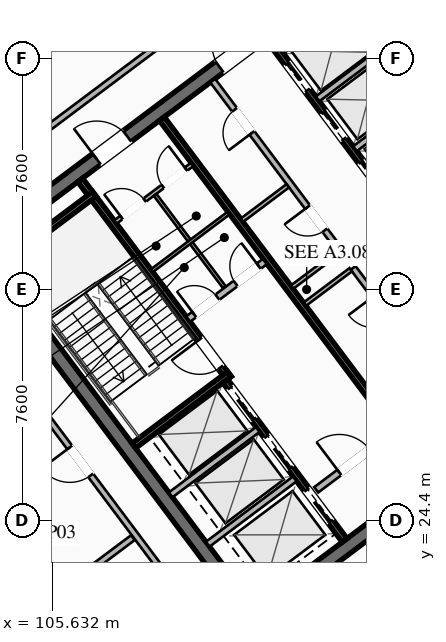
"""IFC4 building model, lengths in metres.
Left out: names, types, materials, properties, quantities, classifications, styles, units other than length and angle.
Written with IfcOpenShell. Run it as: python <this file> out.ifc"""

import sys

from ifc_helpers import new_model, si_unit, direction, frame, frame_2d, origin, place, context, subcontext, project, spatial, rectangle, extrude, element, fill, save


model = new_model("IFC4")
c1 = context("Model", 3, precision=1e-05, world=origin(), true_north=direction((0.0, 1.0)))
c2 = subcontext(c1, "Body", "Model", "MODEL_VIEW")
j1 = project(units=[si_unit("LENGTHUNIT", "METRE"), si_unit("PLANEANGLEUNIT", "RADIAN")], contexts=[c1])
p1 = place(None, origin())
s1 = spatial("IfcSite", under=j1, at=p1, CompositionType="ELEMENT")
p2 = place(p1, origin())
s2 = spatial("IfcBuilding", under=s1, at=p2, CompositionType="ELEMENT")
p3 = place(p2, frame((0.0, 0.0, 246.8)))
s3 = spatial("IfcBuildingStorey", under=s2, at=p3, CompositionType="ELEMENT", Elevation=246.8)
for number, where, z_axis, x_axis in (
    (1, (112.396, 21.047, 0.0), (0.0, 0.0, 1.0), (-0.6, 0.8, 0.0)),
    (2, (115.604, 42.953, 0.0), (0.0, 0.0, 1.0), (0.6, -0.8, 0.0)),
):
    element("IfcWall", number, at=place(p3, frame(where, z_axis=z_axis, x_axis=x_axis)), inside=s3, PredefinedType="SHEAR", context=c2, shape_type="SweptSolid", body=[
        extrude(rectangle(XDim=15.6, YDim=0.45, at=frame_2d((7.8, 0.0))), origin(), (0.0, 0.0, 1.0), 4.6),
    ])
p4 = place(p3, frame((124.649, 30.518, 0.0), z_axis=(0.0, 0.0, 1.0), x_axis=(-0.8, -0.6, 0.0)))
e3 = element("IfcWall", 3, at=p4, inside=s3, PredefinedType="SHEAR", context=c2, shape_type="SweptSolid", body=[
    extrude(rectangle(XDim=15.26, YDim=0.45, at=frame_2d((7.63, 0.0))), origin(), (0.0, 0.0, 1.0), 4.6),
])
p5 = place(p4, frame((9.33, 0.0, 0.0)))
e4 = element("IfcOpeningElement", 4, at=p5, cuts=e3, PredefinedType="OPENING", context=c2, shape_type="SweptSolid", body=[
    extrude(rectangle(XDim=1.25, YDim=2.25, at=frame_2d((0.625, 1.125))), frame((0.0, 0.235, 0.0), z_axis=(0.0, -1.0, 0.0), x_axis=(1.0, 0.0, 0.0)), (0.0, 0.0, 1.0), 0.47),
])
p6 = place(p4, frame((4.28, 0.0, 0.0)))
e5 = element("IfcOpeningElement", 5, at=p6, cuts=e3, PredefinedType="OPENING", context=c2, shape_type="SweptSolid", body=[
    extrude(rectangle(XDim=1.25, YDim=2.25, at=frame_2d((0.625, 1.125))), frame((0.0, 0.235, 0.0), z_axis=(0.0, -1.0, 0.0), x_axis=(1.0, 0.0, 0.0)), (0.0, 0.0, 1.0), 0.47),
])
p7 = place(p3, frame((103.351, 33.482, 0.0), z_axis=(0.0, 0.0, 1.0), x_axis=(0.8, 0.6, 0.0)))
e6 = element("IfcWall", 6, at=p7, inside=s3, PredefinedType="SHEAR", context=c2, shape_type="SweptSolid", body=[
    extrude(rectangle(XDim=15.26, YDim=0.45, at=frame_2d((7.63, 0.0))), origin(), (0.0, 0.0, 1.0), 4.6),
])
p8 = place(p7, frame((4.68, 0.0, 0.0)))
e7 = element("IfcOpeningElement", 7, at=p8, cuts=e6, PredefinedType="OPENING", context=c2, shape_type="SweptSolid", body=[
    extrude(rectangle(XDim=1.25, YDim=2.25, at=frame_2d((0.625, 1.125))), frame((0.0, 0.235, 0.0), z_axis=(0.0, -1.0, 0.0), x_axis=(1.0, 0.0, 0.0)), (0.0, 0.0, 1.0), 0.47),
])
p9 = place(p7, frame((9.73, 0.0, 0.0)))
e8 = element("IfcOpeningElement", 8, at=p9, cuts=e6, PredefinedType="OPENING", context=c2, shape_type="SweptSolid", body=[
    extrude(rectangle(XDim=1.25, YDim=2.25, at=frame_2d((0.625, 1.125))), frame((0.0, 0.235, 0.0), z_axis=(0.0, -1.0, 0.0), x_axis=(1.0, 0.0, 0.0)), (0.0, 0.0, 1.0), 0.47),
])
p10 = place(p3, frame((107.766, 15.512, 0.0), z_axis=(0.0, 0.0, 1.0), x_axis=(-0.6, 0.8, 0.0)))
e9 = element("IfcWall", 9, at=p10, inside=s3, PredefinedType="SOLIDWALL", context=c2, shape_type="SweptSolid", body=[
    extrude(rectangle(XDim=18.9, YDim=0.28, at=frame_2d((9.45, 0.0))), origin(), (0.0, 0.0, 1.0), 4.38),
])
p11 = place(p3, frame((111.44, 29.08, 0.0), z_axis=(0.0, 0.0, 1.0), x_axis=(-0.59999041401, 0.800007189403, 0.0)))
e10 = element("IfcWall", 10, at=p11, inside=s3, PredefinedType="SHEAR", context=c2, shape_type="SweptSolid", body=[
    extrude(rectangle(XDim=8.15, YDim=0.2, at=frame_2d((4.075, 0.0))), origin(), (0.0, 0.0, 1.0), 4.38),
])
p12 = place(p11, frame((0.45, 0.0, 0.0)))
e11 = element("IfcOpeningElement", 11, at=p12, cuts=e10, PredefinedType="OPENING", context=c2, shape_type="SweptSolid", body=[
    extrude(rectangle(XDim=1.15, YDim=2.2, at=frame_2d((0.575, 1.1))), frame((0.0, 0.11, 0.0), z_axis=(0.0, -1.0, 0.0), x_axis=(1.0, 0.0, 0.0)), (0.0, 0.0, 1.0), 0.22),
])
for number, where, z_axis, x_axis in (
    (12, (108.316, 26.862, 0.0), (0.0, 0.0, 1.0), (0.8, 0.6, 0.0)),
    (13, (103.876, 32.782, 0.0), (0.0, 0.0, 1.0), (0.8, 0.6, 0.0)),
):
    element("IfcWall", number, at=place(p3, frame(where, z_axis=z_axis, x_axis=x_axis)), inside=s3, PredefinedType="SHEAR", context=c2, shape_type="SweptSolid", body=[
        extrude(rectangle(XDim=3.93, YDim=0.2, at=frame_2d((1.965, 0.0))), origin(), (0.0, 0.0, 1.0), 4.38),
    ])
p13 = place(p3, frame((118.058, 25.856, 0.0), z_axis=(0.0, 0.0, 1.0), x_axis=(-0.600002657301, 0.799998007018, 0.0)))
e14 = element("IfcWall", 14, at=p13, inside=s3, PredefinedType="SHEAR", context=c2, shape_type="SweptSolid", body=[
    extrude(rectangle(XDim=14.7, YDim=0.2, at=frame_2d((7.35, 0.0))), origin(), (0.0, 0.0, 1.0), 4.38),
])
p14 = place(p3, frame((110.104, 31.028, 0.0), z_axis=(0.0, 0.0, 1.0), x_axis=(0.800018601094, 0.59997519774, 0.0)))
e15 = element("IfcWall", 15, at=p14, inside=s3, PredefinedType="SOLIDWALL", context=c2, shape_type="SweptSolid", body=[
    extrude(rectangle(XDim=3.15, YDim=0.22, at=frame_2d((1.575, 0.0))), origin(), (0.0, 0.0, 1.0), 3.491),
])
p15 = place(p14, frame((0.25, 0.0, 0.0)))
e16 = element("IfcOpeningElement", 16, at=p15, cuts=e15, PredefinedType="OPENING", context=c2, shape_type="SweptSolid", body=[
    extrude(rectangle(XDim=0.95, YDim=2.05, at=frame_2d((0.475, 1.025))), frame((0.0, 0.12, 0.0), z_axis=(0.0, -1.0, 0.0), x_axis=(1.0, 0.0, 0.0)), (0.0, 0.0, 1.0), 0.24),
])
p16 = place(p14, frame((1.95, 0.0, 0.0)))
e17 = element("IfcOpeningElement", 17, at=p16, cuts=e15, PredefinedType="OPENING", context=c2, shape_type="SweptSolid", body=[
    extrude(rectangle(XDim=0.95, YDim=2.05, at=frame_2d((0.475, 1.025))), frame((0.0, 0.12, 0.0), z_axis=(0.0, -1.0, 0.0), x_axis=(1.0, 0.0, 0.0)), (0.0, 0.0, 1.0), 0.24),
])
p17 = place(p3, frame((114.316, 25.412, 0.0), z_axis=(0.0, 0.0, 1.0), x_axis=(0.800018601094, 0.59997519774, 0.0)))
e18 = element("IfcWall", 18, at=p17, inside=s3, PredefinedType="SOLIDWALL", context=c2, shape_type="SweptSolid", body=[
    extrude(rectangle(XDim=3.15, YDim=0.22, at=frame_2d((1.575, 0.0))), origin(), (0.0, 0.0, 1.0), 3.491),
])
p18 = place(p17, frame((0.95, 0.0, 0.0)))
e19 = element("IfcOpeningElement", 19, at=p18, cuts=e18, PredefinedType="OPENING", context=c2, shape_type="SweptSolid", body=[
    extrude(rectangle(XDim=1.25, YDim=2.25, at=frame_2d((0.625, 1.125))), frame((0.0, 0.12, 0.0), z_axis=(0.0, -1.0, 0.0), x_axis=(1.0, 0.0, 0.0)), (0.0, 0.0, 1.0), 0.24),
])
p19 = place(p3, frame((115.25, 23.75, 0.0), z_axis=(0.0, 0.0, 1.0), x_axis=(-0.599994036198, 0.800004472816, 0.0)))
e20 = element("IfcWall", 20, at=p19, inside=s3, PredefinedType="SHEAR", context=c2, shape_type="SweptSolid", body=[
    extrude(rectangle(XDim=6.55, YDim=0.2, at=frame_2d((3.275, 0.0))), origin(), (0.0, 0.0, 1.0), 4.38),
])
p20 = place(p19, frame((4.975, 0.0, 0.0)))
e21 = element("IfcOpeningElement", 21, at=p20, cuts=e20, PredefinedType="OPENING", context=c2, shape_type="SweptSolid", body=[
    extrude(rectangle(XDim=1.3, YDim=2.25, at=frame_2d((0.65, 1.125))), frame((0.0, 0.11, 0.0), z_axis=(0.0, -1.0, 0.0), x_axis=(1.0, 0.0, 0.0)), (0.0, 0.0, 1.0), 0.22),
])
p21 = place(p19, frame((2.975, 0.0, 0.0)))
e22 = element("IfcOpeningElement", 22, at=p21, cuts=e20, PredefinedType="OPENING", context=c2, shape_type="SweptSolid", body=[
    extrude(rectangle(XDim=1.3, YDim=2.25, at=frame_2d((0.65, 1.125))), frame((0.0, 0.11, 0.0), z_axis=(0.0, -1.0, 0.0), x_axis=(1.0, 0.0, 0.0)), (0.0, 0.0, 1.0), 0.22),
])
p22 = place(p19, frame((0.775, 0.0, 0.0)))
e23 = element("IfcOpeningElement", 23, at=p22, cuts=e20, PredefinedType="OPENING", context=c2, shape_type="SweptSolid", body=[
    extrude(rectangle(XDim=1.3, YDim=2.25, at=frame_2d((0.65, 1.125))), frame((0.0, 0.11, 0.0), z_axis=(0.0, -1.0, 0.0), x_axis=(1.0, 0.0, 0.0)), (0.0, 0.0, 1.0), 0.22),
])
for number, where, z_axis, x_axis in (
    (24, (110.746, 23.622, 0.0), (0.0, 0.0, 1.0), (0.8, 0.6, 0.0)),
    (25, (109.528, 25.246, 0.0), (0.0, 0.0, 1.0), (0.8, 0.6, 0.0)),
):
    element("IfcWall", number, at=place(p3, frame(where, z_axis=z_axis, x_axis=x_axis)), inside=s3, PredefinedType="SOLIDWALL", context=c2, shape_type="SweptSolid", body=[
        extrude(rectangle(XDim=3.58, YDim=0.2, at=frame_2d((1.79, 0.0))), origin(), (0.0, 0.0, 1.0), 4.38),
    ])
p23 = place(p3, frame((112.75, 40.25, 0.0), z_axis=(0.0, 0.0, 1.0), x_axis=(0.599994036198, -0.800004472816, 0.0)))
e26 = element("IfcWall", 26, at=p23, inside=s3, PredefinedType="SHEAR", context=c2, shape_type="SweptSolid", body=[
    extrude(rectangle(XDim=6.55, YDim=0.2, at=frame_2d((3.275, 0.0))), origin(), (0.0, 0.0, 1.0), 4.38),
])
p24 = place(p23, frame((5.075, 0.0, 0.0)))
e27 = element("IfcOpeningElement", 27, at=p24, cuts=e26, PredefinedType="OPENING", context=c2, shape_type="SweptSolid", body=[
    extrude(rectangle(XDim=1.1, YDim=2.2, at=frame_2d((0.55, 1.1))), frame((0.0, 0.11, 0.0), z_axis=(0.0, -1.0, 0.0), x_axis=(1.0, 0.0, 0.0)), (0.0, 0.0, 1.0), 0.22),
])
p25 = place(p23, frame((3.025, 0.0, 0.0)))
e28 = element("IfcOpeningElement", 28, at=p25, cuts=e26, PredefinedType="OPENING", context=c2, shape_type="SweptSolid", body=[
    extrude(rectangle(XDim=1.1, YDim=2.2, at=frame_2d((0.55, 1.1))), frame((0.0, 0.11, 0.0), z_axis=(0.0, -1.0, 0.0), x_axis=(1.0, 0.0, 0.0)), (0.0, 0.0, 1.0), 0.22),
])
p26 = place(p23, frame((1.025, 0.0, 0.0)))
e29 = element("IfcOpeningElement", 29, at=p26, cuts=e26, PredefinedType="OPENING", context=c2, shape_type="SweptSolid", body=[
    extrude(rectangle(XDim=1.1, YDim=2.2, at=frame_2d((0.55, 1.1))), frame((0.0, 0.11, 0.0), z_axis=(0.0, -1.0, 0.0), x_axis=(1.0, 0.0, 0.0)), (0.0, 0.0, 1.0), 0.22),
])
for number, where, z_axis, x_axis in (
    (30, (115.59, 36.63, 0.0), (0.0, 0.0, 1.0), (0.8, 0.6, 0.0)),
    (31, (114.36, 38.27, 0.0), (0.0, 0.0, 1.0), (0.8, 0.6, 0.0)),
):
    element("IfcWall", number, at=place(p3, frame(where, z_axis=z_axis, x_axis=x_axis)), inside=s3, PredefinedType="SOLIDWALL", context=c2, shape_type="SweptSolid", body=[
        extrude(rectangle(XDim=3.58, YDim=0.2, at=frame_2d((1.79, 0.0))), origin(), (0.0, 0.0, 1.0), 4.38),
    ])
p27 = place(p3, frame((107.71, 34.22, 0.0), z_axis=(0.0, 0.0, 1.0), x_axis=(0.799981399002, 0.60002480053, 0.0)))
e32 = element("IfcWall", 32, at=p27, inside=s3, PredefinedType="PARTITIONING", context=c2, shape_type="SweptSolid", body=[
    extrude(rectangle(XDim=3.15, YDim=0.135, at=frame_2d((1.575, 0.0))), origin(), (0.0, 0.0, 1.0), 3.491),
])
p28 = place(p27, frame((0.25, 0.0, 0.0)))
e33 = element("IfcOpeningElement", 33, at=p28, cuts=e32, PredefinedType="OPENING", context=c2, shape_type="SweptSolid", body=[
    extrude(rectangle(XDim=0.95, YDim=2.05, at=frame_2d((0.475, 1.025))), frame((0.0, 0.077, 0.0), z_axis=(0.0, -1.0, 0.0), x_axis=(1.0, 0.0, 0.0)), (0.0, 0.0, 1.0), 0.155),
])
p29 = place(p27, frame((1.95, 0.0, 0.0)))
e34 = element("IfcOpeningElement", 34, at=p29, cuts=e32, PredefinedType="OPENING", context=c2, shape_type="SweptSolid", body=[
    extrude(rectangle(XDim=0.95, YDim=2.05, at=frame_2d((0.475, 1.025))), frame((0.0, 0.077, 0.0), z_axis=(0.0, -1.0, 0.0), x_axis=(1.0, 0.0, 0.0)), (0.0, 0.0, 1.0), 0.155),
])
p30 = place(p3, frame((111.296, 32.072, 0.0), z_axis=(0.0, 0.0, 1.0), x_axis=(-0.59995887973, 0.800030838552, 0.0)))
e35 = element("IfcWall", 35, at=p30, inside=s3, PredefinedType="PARTITIONING", context=c2, shape_type="SweptSolid", body=[
    extrude(rectangle(XDim=3.8, YDim=0.11, at=frame_2d((1.9, 0.0))), origin(), (0.0, 0.0, 1.0), 3.491),
])
p31 = place(p3, frame((108.91, 32.62, 0.0), z_axis=(0.0, 0.0, 1.0), x_axis=(0.800018601094, 0.59997519774, 0.0)))
e36 = element("IfcWall", 36, at=p31, inside=s3, PredefinedType="PARTITIONING", context=c2, shape_type="SweptSolid", body=[
    extrude(rectangle(XDim=3.15, YDim=0.11, at=frame_2d((1.575, 0.0))), origin(), (0.0, 0.0, 1.0), 3.491),
])
p32 = place(p3, frame((119.73, 27.11, 0.0), z_axis=(0.0, 0.0, 1.0), x_axis=(-0.600005580459, 0.799995814625, 0.0)))
e37 = element("IfcWall", 37, at=p32, inside=s3, PredefinedType="SOLIDWALL", context=c2, shape_type="SweptSolid", body=[
    extrude(rectangle(XDim=7.0, YDim=0.2, at=frame_2d((3.5, 0.0))), origin(), (0.0, 0.0, 1.0), 3.491),
])
p33 = place(p32, frame((0.85, 0.0, 0.0)))
e38 = element("IfcOpeningElement", 38, at=p33, cuts=e37, PredefinedType="OPENING", context=c2, shape_type="SweptSolid", body=[
    extrude(rectangle(XDim=0.95, YDim=2.05, at=frame_2d((0.475, 1.025))), frame((0.0, 0.11, 0.0), z_axis=(0.0, -1.0, 0.0), x_axis=(1.0, 0.0, 0.0)), (0.0, 0.0, 1.0), 0.22),
])
p34 = place(p32, frame((4.8, 0.0, 0.0)))
e39 = element("IfcOpeningElement", 39, at=p34, cuts=e37, PredefinedType="OPENING", context=c2, shape_type="SweptSolid", body=[
    extrude(rectangle(XDim=1.05, YDim=2.2, at=frame_2d((0.525, 1.1))), frame((0.0, 0.11, 0.0), z_axis=(0.0, -1.0, 0.0), x_axis=(1.0, 0.0, 0.0)), (0.0, 0.0, 1.0), 0.22),
])
p35 = place(p3, frame((113.946, 31.522, 0.0), z_axis=(0.0, 0.0, 1.0), x_axis=(0.8, 0.6, 0.0)))
e40 = element("IfcWall", 40, at=p35, inside=s3, PredefinedType="PARTITIONING", context=c2, shape_type="SweptSolid", body=[
    extrude(rectangle(XDim=1.88, YDim=0.135, at=frame_2d((0.94, 0.0))), origin(), (0.0, 0.0, 1.0), 3.491),
])
p36 = place(p3, frame((115.11, 33.27, 0.0), z_axis=(0.0, 0.0, 1.0), x_axis=(-0.600011160345, 0.79999162962, 0.0)))
e41 = element("IfcWall", 41, at=p36, inside=s3, PredefinedType="SOLIDWALL", context=c2, shape_type="SweptSolid", body=[
    extrude(rectangle(XDim=7.0, YDim=0.2, at=frame_2d((3.5, 0.0))), origin(), (0.0, 0.0, 1.0), 3.491),
])
p37 = place(p36, frame((0.85, 0.0, 0.0)))
e42 = element("IfcOpeningElement", 42, at=p37, cuts=e41, PredefinedType="OPENING", context=c2, shape_type="SweptSolid", body=[
    extrude(rectangle(XDim=0.95, YDim=2.05, at=frame_2d((0.475, 1.025))), frame((0.0, 0.11, 0.0), z_axis=(0.0, -1.0, 0.0), x_axis=(1.0, 0.0, 0.0)), (0.0, 0.0, 1.0), 0.22),
])
p38 = place(p36, frame((4.85, 0.0, 0.0)))
e43 = element("IfcOpeningElement", 43, at=p38, cuts=e41, PredefinedType="OPENING", context=c2, shape_type="SweptSolid", body=[
    extrude(rectangle(XDim=0.95, YDim=2.05, at=frame_2d((0.475, 1.025))), frame((0.0, 0.11, 0.0), z_axis=(0.0, -1.0, 0.0), x_axis=(1.0, 0.0, 0.0)), (0.0, 0.0, 1.0), 0.22),
])
p39 = place(p3, frame((113.526, 32.082, 0.0), z_axis=(0.0, 0.0, 1.0), x_axis=(0.800046745961, 0.599937666993, 0.0)))
e44 = element("IfcWall", 44, at=p39, inside=s3, PredefinedType="PARTITIONING", context=c2, shape_type="SweptSolid", body=[
    extrude(rectangle(XDim=1.88, YDim=0.135, at=frame_2d((0.94, 0.0))), origin(), (0.0, 0.0, 1.0), 3.491),
])
p40 = place(p3, frame((111.876, 34.282, 0.0), z_axis=(0.0, 0.0, 1.0), x_axis=(0.8, 0.6, 0.0)))
e45 = element("IfcWall", 45, at=p40, inside=s3, PredefinedType="PARTITIONING", context=c2, shape_type="SweptSolid", body=[
    extrude(rectangle(XDim=1.88, YDim=0.135, at=frame_2d((0.94, 0.0))), origin(), (0.0, 0.0, 1.0), 3.491),
])
for number, where, z_axis, x_axis in (
    (46, (100.91, 33.87, 0.0), (0.0, 0.0, 1.0), (0.8, 0.6, 0.0)),
    (47, (127.09, 30.13, 0.0), (0.0, 0.0, 1.0), (-0.8, -0.6, 0.0)),
):
    element("IfcWall", number, at=place(p3, frame(where, z_axis=z_axis, x_axis=x_axis)), inside=s3, PredefinedType="SOLIDWALL", context=c2, shape_type="SweptSolid", body=[
        extrude(rectangle(XDim=18.7, YDim=0.2, at=frame_2d((9.35, 0.0))), origin(), (0.0, 0.0, 1.0), 3.491),
    ])
p41 = place(p3, frame((112.058, 19.006, 0.0), z_axis=(0.0, 0.0, 1.0), x_axis=(-0.600010580279, 0.799992064682, 0.0)))
e48 = element("IfcWall", 48, at=p41, inside=s3, PredefinedType="SOLIDWALL", context=c2, shape_type="SweptSolid", body=[
    extrude(rectangle(XDim=18.46, YDim=0.2, at=frame_2d((9.23, 0.0))), origin(), (0.0, 0.0, 1.0), 3.491),
])
p42 = place(p41, frame((2.2, 0.0, 0.0)))
e49 = element("IfcOpeningElement", 49, at=p42, cuts=e48, PredefinedType="OPENING", context=c2, shape_type="SweptSolid", body=[
    extrude(rectangle(XDim=1.25, YDim=2.25, at=frame_2d((0.625, 1.125))), frame((0.0, 0.11, 0.0), z_axis=(0.0, -1.0, 0.0), x_axis=(1.0, 0.0, 0.0)), (0.0, 0.0, 1.0), 0.22),
])
p43 = place(p41, frame((8.6, 0.0, 0.0)))
e50 = element("IfcOpeningElement", 50, at=p43, cuts=e48, PredefinedType="OPENING", context=c2, shape_type="SweptSolid", body=[
    extrude(rectangle(XDim=1.15, YDim=2.2, at=frame_2d((0.575, 1.1))), frame((0.0, 0.11, 0.0), z_axis=(0.0, -1.0, 0.0), x_axis=(1.0, 0.0, 0.0)), (0.0, 0.0, 1.0), 0.22),
])
p44 = place(p41, frame((16.0, 0.0, 0.0)))
e51 = element("IfcOpeningElement", 51, at=p44, cuts=e48, PredefinedType="OPENING", context=c2, shape_type="SweptSolid", body=[
    extrude(rectangle(XDim=1.15, YDim=2.2, at=frame_2d((0.575, 1.1))), frame((0.0, 0.11, 0.0), z_axis=(0.0, -1.0, 0.0), x_axis=(1.0, 0.0, 0.0)), (0.0, 0.0, 1.0), 0.22),
])
p45 = place(p3, frame((103.956, 20.592, 0.0), z_axis=(0.0, 0.0, 1.0), x_axis=(0.800005415472, 0.599992779303, 0.0)))
e52 = element("IfcWall", 52, at=p45, inside=s3, PredefinedType="SOLIDWALL", context=c2, shape_type="SweptSolid", body=[
    extrude(rectangle(XDim=5.41, YDim=0.2, at=frame_2d((2.705, 0.0))), origin(), (0.0, 0.0, 1.0), 3.491),
])
p46 = place(p8, origin())
e53 = element("IfcDoor", 53, at=p46, inside=s3, OperationType="SINGLE_SWING_LEFT", PredefinedType="DOOR", context=c2, shape_type="SweptSolid", body=[
    extrude(rectangle(XDim=1.25, YDim=2.25, at=frame_2d((0.625, 1.125))), frame((0.0, 0.025, 0.0), z_axis=(0.0, -1.0, 0.0), x_axis=(1.0, 0.0, 0.0)), (0.0, 0.0, 1.0), 0.05),
])
fill(e7, e53)
p47 = place(p9, origin())
e54 = element("IfcDoor", 54, at=p47, inside=s3, OperationType="SINGLE_SWING_RIGHT", PredefinedType="DOOR", context=c2, shape_type="SweptSolid", body=[
    extrude(rectangle(XDim=1.25, YDim=2.25, at=frame_2d((0.625, 1.125))), frame((0.0, 0.025, 0.0), z_axis=(0.0, -1.0, 0.0), x_axis=(1.0, 0.0, 0.0)), (0.0, 0.0, 1.0), 0.05),
])
fill(e8, e54)
p48 = place(p12, origin())
e55 = element("IfcDoor", 55, at=p48, inside=s3, OperationType="SINGLE_SWING_RIGHT", PredefinedType="DOOR", context=c2, shape_type="SweptSolid", body=[
    extrude(rectangle(XDim=1.15, YDim=2.2, at=frame_2d((0.575, 1.1))), frame((0.0, 0.025, 0.0), z_axis=(0.0, -1.0, 0.0), x_axis=(1.0, 0.0, 0.0)), (0.0, 0.0, 1.0), 0.05),
])
fill(e11, e55)
p49 = place(p18, origin())
e56 = element("IfcDoor", 56, at=p49, inside=s3, OperationType="SINGLE_SWING_LEFT", PredefinedType="DOOR", context=c2, shape_type="SweptSolid", body=[
    extrude(rectangle(XDim=1.25, YDim=2.25, at=frame_2d((0.625, 1.125))), frame((0.0, 0.025, 0.0), z_axis=(0.0, -1.0, 0.0), x_axis=(1.0, 0.0, 0.0)), (0.0, 0.0, 1.0), 0.05),
])
fill(e19, e56)
p50 = place(p28, origin())
e57 = element("IfcDoor", 57, at=p50, inside=s3, OperationType="SINGLE_SWING_LEFT", PredefinedType="DOOR", context=c2, shape_type="SweptSolid", body=[
    extrude(rectangle(XDim=0.95, YDim=2.05, at=frame_2d((0.475, 1.025))), frame((0.0, 0.025, 0.0), z_axis=(0.0, -1.0, 0.0), x_axis=(1.0, 0.0, 0.0)), (0.0, 0.0, 1.0), 0.05),
])
fill(e33, e57)
p51 = place(p29, origin())
e58 = element("IfcDoor", 58, at=p51, inside=s3, OperationType="SINGLE_SWING_RIGHT", PredefinedType="DOOR", context=c2, shape_type="SweptSolid", body=[
    extrude(rectangle(XDim=0.95, YDim=2.05, at=frame_2d((0.475, 1.025))), frame((0.0, 0.025, 0.0), z_axis=(0.0, -1.0, 0.0), x_axis=(1.0, 0.0, 0.0)), (0.0, 0.0, 1.0), 0.05),
])
fill(e34, e58)
p52 = place(p15, origin())
e59 = element("IfcDoor", 59, at=p52, inside=s3, OperationType="SINGLE_SWING_LEFT", PredefinedType="DOOR", context=c2, shape_type="SweptSolid", body=[
    extrude(rectangle(XDim=0.95, YDim=2.05, at=frame_2d((0.475, 1.025))), frame((0.0, 0.025, 0.0), z_axis=(0.0, -1.0, 0.0), x_axis=(1.0, 0.0, 0.0)), (0.0, 0.0, 1.0), 0.05),
])
fill(e16, e59)
p53 = place(p16, origin())
e60 = element("IfcDoor", 60, at=p53, inside=s3, OperationType="SINGLE_SWING_RIGHT", PredefinedType="DOOR", context=c2, shape_type="SweptSolid", body=[
    extrude(rectangle(XDim=0.95, YDim=2.05, at=frame_2d((0.475, 1.025))), frame((0.0, 0.025, 0.0), z_axis=(0.0, -1.0, 0.0), x_axis=(1.0, 0.0, 0.0)), (0.0, 0.0, 1.0), 0.05),
])
fill(e17, e60)
p54 = place(p37, origin())
e61 = element("IfcDoor", 61, at=p54, inside=s3, OperationType="SINGLE_SWING_RIGHT", PredefinedType="DOOR", context=c2, shape_type="SweptSolid", body=[
    extrude(rectangle(XDim=0.95, YDim=2.05, at=frame_2d((0.475, 1.025))), frame((0.0, 0.025, 0.0), z_axis=(0.0, -1.0, 0.0), x_axis=(1.0, 0.0, 0.0)), (0.0, 0.0, 1.0), 0.05),
])
fill(e42, e61)
p55 = place(p38, origin())
e62 = element("IfcDoor", 62, at=p55, inside=s3, OperationType="SINGLE_SWING_LEFT", PredefinedType="DOOR", context=c2, shape_type="SweptSolid", body=[
    extrude(rectangle(XDim=0.95, YDim=2.05, at=frame_2d((0.475, 1.025))), frame((0.0, 0.025, 0.0), z_axis=(0.0, -1.0, 0.0), x_axis=(1.0, 0.0, 0.0)), (0.0, 0.0, 1.0), 0.05),
])
fill(e43, e62)
p56 = place(p43, origin())
e63 = element("IfcDoor", 63, at=p56, inside=s3, OperationType="SINGLE_SWING_RIGHT", PredefinedType="DOOR", context=c2, shape_type="SweptSolid", body=[
    extrude(rectangle(XDim=1.15, YDim=2.2, at=frame_2d((0.575, 1.1))), frame((0.0, 0.025, 0.0), z_axis=(0.0, -1.0, 0.0), x_axis=(1.0, 0.0, 0.0)), (0.0, 0.0, 1.0), 0.05),
])
fill(e50, e63)
p57 = place(p20, origin())
e64 = element("IfcDoor", 64, at=p57, inside=s3, OperationType="SLIDING_TO_LEFT", PredefinedType="DOOR", context=c2, shape_type="SweptSolid", body=[
    extrude(rectangle(XDim=1.3, YDim=2.25, at=frame_2d((0.65, 1.125))), frame((0.0, 0.025, 0.0), z_axis=(0.0, -1.0, 0.0), x_axis=(1.0, 0.0, 0.0)), (0.0, 0.0, 1.0), 0.05),
])
fill(e21, e64)
p58 = place(p21, origin())
e65 = element("IfcDoor", 65, at=p58, inside=s3, OperationType="SLIDING_TO_LEFT", PredefinedType="DOOR", context=c2, shape_type="SweptSolid", body=[
    extrude(rectangle(XDim=1.3, YDim=2.25, at=frame_2d((0.65, 1.125))), frame((0.0, 0.025, 0.0), z_axis=(0.0, -1.0, 0.0), x_axis=(1.0, 0.0, 0.0)), (0.0, 0.0, 1.0), 0.05),
])
fill(e22, e65)
p59 = place(p22, origin())
e66 = element("IfcDoor", 66, at=p59, inside=s3, OperationType="SLIDING_TO_LEFT", PredefinedType="DOOR", context=c2, shape_type="SweptSolid", body=[
    extrude(rectangle(XDim=1.3, YDim=2.25, at=frame_2d((0.65, 1.125))), frame((0.0, 0.025, 0.0), z_axis=(0.0, -1.0, 0.0), x_axis=(1.0, 0.0, 0.0)), (0.0, 0.0, 1.0), 0.05),
])
fill(e23, e66)
p60 = place(p24, origin())
e67 = element("IfcDoor", 67, at=p60, inside=s3, OperationType="SLIDING_TO_LEFT", PredefinedType="DOOR", context=c2, shape_type="SweptSolid", body=[
    extrude(rectangle(XDim=1.1, YDim=2.2, at=frame_2d((0.55, 1.1))), frame((0.0, 0.025, 0.0), z_axis=(0.0, -1.0, 0.0), x_axis=(1.0, 0.0, 0.0)), (0.0, 0.0, 1.0), 0.05),
])
fill(e27, e67)
p61 = place(p25, origin())
e68 = element("IfcDoor", 68, at=p61, inside=s3, OperationType="SLIDING_TO_LEFT", PredefinedType="DOOR", context=c2, shape_type="SweptSolid", body=[
    extrude(rectangle(XDim=1.1, YDim=2.2, at=frame_2d((0.55, 1.1))), frame((0.0, 0.025, 0.0), z_axis=(0.0, -1.0, 0.0), x_axis=(1.0, 0.0, 0.0)), (0.0, 0.0, 1.0), 0.05),
])
fill(e28, e68)
p62 = place(p26, origin())
e69 = element("IfcDoor", 69, at=p62, inside=s3, OperationType="SLIDING_TO_LEFT", PredefinedType="DOOR", context=c2, shape_type="SweptSolid", body=[
    extrude(rectangle(XDim=1.1, YDim=2.2, at=frame_2d((0.55, 1.1))), frame((0.0, 0.025, 0.0), z_axis=(0.0, -1.0, 0.0), x_axis=(1.0, 0.0, 0.0)), (0.0, 0.0, 1.0), 0.05),
])
fill(e29, e69)
save(model, sys.argv[1])
